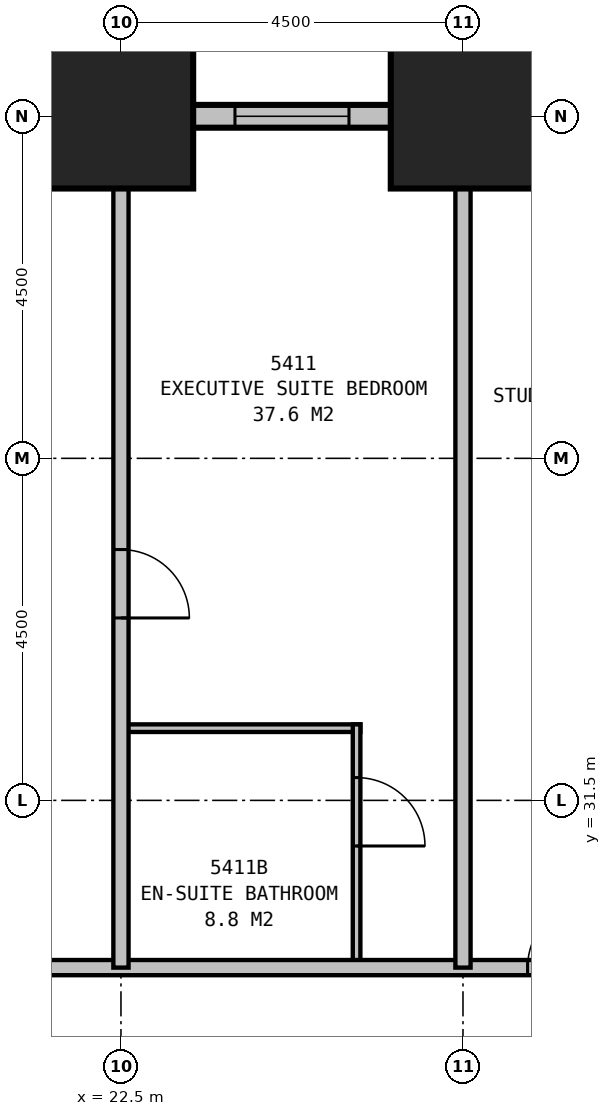
"""IFC4 building model, lengths in metres.
Left out: names, types, materials, properties, quantities, classifications, styles, units other than length and angle.
Written with IfcOpenShell. Run it as: python <this file> out.ifc"""

import sys

from ifc_helpers import new_model, si_unit, direction, frame, frame_2d, origin, origin_2d, place, context, subcontext, project, spatial, rectangle, extrude, element, fill, save


model = new_model("IFC4")
c1 = context("Model", 3, precision=1e-05, world=origin(), true_north=direction((0.0, 1.0)))
c2 = subcontext(c1, "Body", "Model", "MODEL_VIEW")
j1 = project(units=[si_unit("LENGTHUNIT", "METRE"), si_unit("PLANEANGLEUNIT", "RADIAN")], contexts=[c1])
p1 = place(None, origin())
s1 = spatial("IfcSite", under=j1, at=p1, CompositionType="ELEMENT")
p2 = place(p1, origin())
s2 = spatial("IfcBuilding", under=s1, at=p2, CompositionType="ELEMENT")
p3 = place(p2, frame((0.0, 0.0, 207.9)))
s3 = spatial("IfcBuildingStorey", under=s2, at=p3, CompositionType="ELEMENT", Elevation=207.9)
for number, where, z_axis, x_axis in (
    (1, (27.0, 40.5, 0.0), (0.0, 0.0, 1.0), (1.0, 0.0, 0.0)),
    (2, (22.5, 40.5, 0.0), (0.0, 0.0, 1.0), (1.0, 0.0, 0.0)),
):
    element("IfcColumn", number, at=place(p3, frame(where, z_axis=z_axis, x_axis=x_axis)), inside=s3, PredefinedType="COLUMN", context=c2, shape_type="SweptSolid", body=[
        extrude(rectangle(XDim=1.9, YDim=1.9, at=origin_2d()), origin(), (0.0, 0.0, 1.0), 3.5),
    ])
p4 = place(p3, frame((40.65, 40.5, 0.0), z_axis=(0.0, 0.0, 1.0), x_axis=(-1.0, 0.0, 0.0)))
e3 = element("IfcWall", 3, at=p4, inside=s3, PredefinedType="STANDARD", context=c2, shape_type="SweptSolid", body=[
    extrude(rectangle(XDim=31.8, YDim=0.3, at=frame_2d((15.9, 0.0))), origin(), (0.0, 0.0, 1.0), 1.9),
])
p5 = place(p4, frame((1.65, 0.0, 0.5)))
e4 = element("IfcOpeningElement", 4, at=p5, cuts=e3, PredefinedType="OPENING", context=c2, shape_type="SweptSolid", body=[
    extrude(rectangle(XDim=1.5, YDim=1.2, at=frame_2d((0.75, 0.6))), frame((0.0, 0.16, 0.0), z_axis=(0.0, -1.0, 0.0), x_axis=(1.0, 0.0, 0.0)), (0.0, 0.0, 1.0), 0.32),
])
p6 = place(p4, frame((6.15, 0.0, 0.5)))
e5 = element("IfcOpeningElement", 5, at=p6, cuts=e3, PredefinedType="OPENING", context=c2, shape_type="SweptSolid", body=[
    extrude(rectangle(XDim=1.5, YDim=1.2, at=frame_2d((0.75, 0.6))), frame((0.0, 0.16, 0.0), z_axis=(0.0, -1.0, 0.0), x_axis=(1.0, 0.0, 0.0)), (0.0, 0.0, 1.0), 0.32),
])
p7 = place(p4, frame((10.65, 0.0, 0.5)))
e6 = element("IfcOpeningElement", 6, at=p7, cuts=e3, PredefinedType="OPENING", context=c2, shape_type="SweptSolid", body=[
    extrude(rectangle(XDim=1.5, YDim=1.2, at=frame_2d((0.75, 0.6))), frame((0.0, 0.16, 0.0), z_axis=(0.0, -1.0, 0.0), x_axis=(1.0, 0.0, 0.0)), (0.0, 0.0, 1.0), 0.32),
])
p8 = place(p4, frame((15.15, 0.0, 0.5)))
e7 = element("IfcOpeningElement", 7, at=p8, cuts=e3, PredefinedType="OPENING", context=c2, shape_type="SweptSolid", body=[
    extrude(rectangle(XDim=1.5, YDim=1.2, at=frame_2d((0.75, 0.6))), frame((0.0, 0.16, 0.0), z_axis=(0.0, -1.0, 0.0), x_axis=(1.0, 0.0, 0.0)), (0.0, 0.0, 1.0), 0.32),
])
p9 = place(p4, frame((19.65, 0.0, 0.5)))
e8 = element("IfcOpeningElement", 8, at=p9, cuts=e3, PredefinedType="OPENING", context=c2, shape_type="SweptSolid", body=[
    extrude(rectangle(XDim=1.5, YDim=1.2, at=frame_2d((0.75, 0.6))), frame((0.0, 0.16, 0.0), z_axis=(0.0, -1.0, 0.0), x_axis=(1.0, 0.0, 0.0)), (0.0, 0.0, 1.0), 0.32),
])
p10 = place(p4, frame((24.15, 0.0, 0.5)))
e9 = element("IfcOpeningElement", 9, at=p10, cuts=e3, PredefinedType="OPENING", context=c2, shape_type="SweptSolid", body=[
    extrude(rectangle(XDim=1.5, YDim=1.2, at=frame_2d((0.75, 0.6))), frame((0.0, 0.16, 0.0), z_axis=(0.0, -1.0, 0.0), x_axis=(1.0, 0.0, 0.0)), (0.0, 0.0, 1.0), 0.32),
])
p11 = place(p4, frame((28.65, 0.0, 0.5)))
e10 = element("IfcOpeningElement", 10, at=p11, cuts=e3, PredefinedType="OPENING", context=c2, shape_type="SweptSolid", body=[
    extrude(rectangle(XDim=1.5, YDim=1.2, at=frame_2d((0.75, 0.6))), frame((0.0, 0.16, 0.0), z_axis=(0.0, -1.0, 0.0), x_axis=(1.0, 0.0, 0.0)), (0.0, 0.0, 1.0), 0.32),
])
p12 = place(p3, frame((11.2, 29.3, 0.0), z_axis=(0.0, 0.0, 1.0), x_axis=(1.0, 0.0, 0.0)))
e11 = element("IfcWall", 11, at=p12, inside=s3, PredefinedType="PARTITIONING", context=c2, shape_type="SweptSolid", body=[
    extrude(rectangle(XDim=27.1, YDim=0.2, at=frame_2d((13.55, 0.0))), origin(), (0.0, 0.0, 1.0), 3.25),
])
p13 = place(p12, frame((3.15, 0.0, 0.0)))
e12 = element("IfcOpeningElement", 12, at=p13, cuts=e11, PredefinedType="OPENING", context=c2, shape_type="SweptSolid", body=[
    extrude(rectangle(XDim=0.9, YDim=2.1, at=frame_2d((0.45, 1.05))), frame((0.0, 0.11, 0.0), z_axis=(0.0, -1.0, 0.0), x_axis=(1.0, 0.0, 0.0)), (0.0, 0.0, 1.0), 0.22),
])
p14 = place(p12, frame((16.65, 0.0, 0.0)))
e13 = element("IfcOpeningElement", 13, at=p14, cuts=e11, PredefinedType="OPENING", context=c2, shape_type="SweptSolid", body=[
    extrude(rectangle(XDim=0.9, YDim=2.1, at=frame_2d((0.45, 1.05))), frame((0.0, 0.11, 0.0), z_axis=(0.0, -1.0, 0.0), x_axis=(1.0, 0.0, 0.0)), (0.0, 0.0, 1.0), 0.22),
])
p15 = place(p12, frame((25.5, 0.0, 0.0)))
e14 = element("IfcOpeningElement", 14, at=p15, cuts=e11, PredefinedType="OPENING", context=c2, shape_type="SweptSolid", body=[
    extrude(rectangle(XDim=0.9, YDim=2.1, at=frame_2d((0.45, 1.05))), frame((0.0, 0.11, 0.0), z_axis=(0.0, -1.0, 0.0), x_axis=(1.0, 0.0, 0.0)), (0.0, 0.0, 1.0), 0.22),
])
p16 = place(p12, frame((0.7, 0.0, 0.0)))
e15 = element("IfcOpeningElement", 15, at=p16, cuts=e11, PredefinedType="OPENING", context=c2, shape_type="SweptSolid", body=[
    extrude(rectangle(XDim=0.9, YDim=2.1, at=frame_2d((0.45, 1.05))), frame((0.0, 0.11, 0.0), z_axis=(0.0, -1.0, 0.0), x_axis=(1.0, 0.0, 0.0)), (0.0, 0.0, 1.0), 0.22),
])
p17 = place(p3, frame((22.5, 29.3, 0.0), z_axis=(0.0, 0.0, 1.0), x_axis=(0.0, 1.0, 0.0)))
e16 = element("IfcWall", 16, at=p17, inside=s3, PredefinedType="PARTITIONING", context=c2, shape_type="SweptSolid", body=[
    extrude(rectangle(XDim=11.2, YDim=0.2, at=frame_2d((5.6, 0.0))), origin(), (0.0, 0.0, 1.0), 2.2),
])
p18 = place(p17, frame((5.5, 0.0, 0.0), z_axis=(0.0, 0.0, 1.0), x_axis=(-1.0, 0.0, 0.0)))
e17 = element("IfcOpeningElement", 17, at=p18, cuts=e16, PredefinedType="OPENING", context=c2, shape_type="SweptSolid", body=[
    extrude(rectangle(XDim=0.9, YDim=2.1, at=frame_2d((0.45, 1.05))), frame((0.0, 0.11, 0.0), z_axis=(0.0, -1.0, 0.0), x_axis=(1.0, 0.0, 0.0)), (0.0, 0.0, 1.0), 0.22),
])
p19 = place(p3, frame((27.0, 29.3, 0.0), z_axis=(0.0, 0.0, 1.0), x_axis=(0.0, 1.0, 0.0)))
e18 = element("IfcWall", 18, at=p19, inside=s3, PredefinedType="PARTITIONING", context=c2, shape_type="SweptSolid", body=[
    extrude(rectangle(XDim=11.2, YDim=0.2, at=frame_2d((5.6, 0.0))), origin(), (0.0, 0.0, 1.0), 2.2),
])
p20 = place(p3, frame((22.5, 32.45, 0.0), z_axis=(0.0, 0.0, 1.0), x_axis=(1.0, 0.0, 0.0)))
e19 = element("IfcWall", 19, at=p20, inside=s3, PredefinedType="PLUMBINGWALL", context=c2, shape_type="SweptSolid", body=[
    extrude(rectangle(XDim=3.15, YDim=0.1, at=frame_2d((1.575, 0.0))), origin(), (0.0, 0.0, 1.0), 3.25),
])
p21 = place(p3, frame((25.6, 29.3, 0.0), z_axis=(0.0, 0.0, 1.0), x_axis=(0.0, 1.0, 0.0)))
e20 = element("IfcWall", 20, at=p21, inside=s3, PredefinedType="PLUMBINGWALL", context=c2, shape_type="SweptSolid", body=[
    extrude(rectangle(XDim=3.2, YDim=0.1, at=frame_2d((1.6, 0.0))), origin(), (0.0, 0.0, 1.0), 3.25),
])
p22 = place(p21, frame((2.5, 0.0, 0.0), z_axis=(0.0, 0.0, 1.0), x_axis=(-1.0, 0.0, 0.0)))
e21 = element("IfcOpeningElement", 21, at=p22, cuts=e20, PredefinedType="OPENING", context=c2, shape_type="SweptSolid", body=[
    extrude(rectangle(XDim=0.9, YDim=2.1, at=frame_2d((0.45, 1.05))), frame((0.0, 0.06, 0.0), z_axis=(0.0, -1.0, 0.0), x_axis=(1.0, 0.0, 0.0)), (0.0, 0.0, 1.0), 0.12),
])
p23 = place(p8, origin())
e22 = element("IfcWindow", 22, at=p23, inside=s3, PartitioningType="SINGLE_PANEL", PredefinedType="WINDOW", context=c2, shape_type="SweptSolid", body=[
    extrude(rectangle(XDim=1.5, YDim=1.2, at=frame_2d((0.75, 0.6))), frame((0.0, 0.03, 0.0), z_axis=(0.0, -1.0, 0.0), x_axis=(1.0, 0.0, 0.0)), (0.0, 0.0, 1.0), 0.06),
])
fill(e7, e22)
p24 = place(p14, origin())
e23 = element("IfcDoor", 23, at=p24, inside=s3, OperationType="SINGLE_SWING_RIGHT", PredefinedType="DOOR", context=c2, shape_type="SweptSolid", body=[
    extrude(rectangle(XDim=0.9, YDim=2.1, at=frame_2d((0.45, 1.05))), frame((0.0, 0.025, 0.0), z_axis=(0.0, -1.0, 0.0), x_axis=(1.0, 0.0, 0.0)), (0.0, 0.0, 1.0), 0.05),
])
fill(e13, e23)
p25 = place(p18, origin())
e24 = element("IfcDoor", 24, at=p25, inside=s3, OperationType="SINGLE_SWING_RIGHT", PredefinedType="DOOR", context=c2, shape_type="SweptSolid", body=[
    extrude(rectangle(XDim=0.9, YDim=2.1, at=frame_2d((0.45, 1.05))), frame((0.0, 0.025, 0.0), z_axis=(0.0, -1.0, 0.0), x_axis=(1.0, 0.0, 0.0)), (0.0, 0.0, 1.0), 0.05),
])
fill(e17, e24)
p26 = place(p22, origin())
e25 = element("IfcDoor", 25, at=p26, inside=s3, OperationType="SINGLE_SWING_RIGHT", PredefinedType="DOOR", context=c2, shape_type="SweptSolid", body=[
    extrude(rectangle(XDim=0.9, YDim=2.1, at=frame_2d((0.45, 1.05))), frame((0.0, 0.025, 0.0), z_axis=(0.0, -1.0, 0.0), x_axis=(1.0, 0.0, 0.0)), (0.0, 0.0, 1.0), 0.05),
])
fill(e21, e25)
save(model, sys.argv[1])
